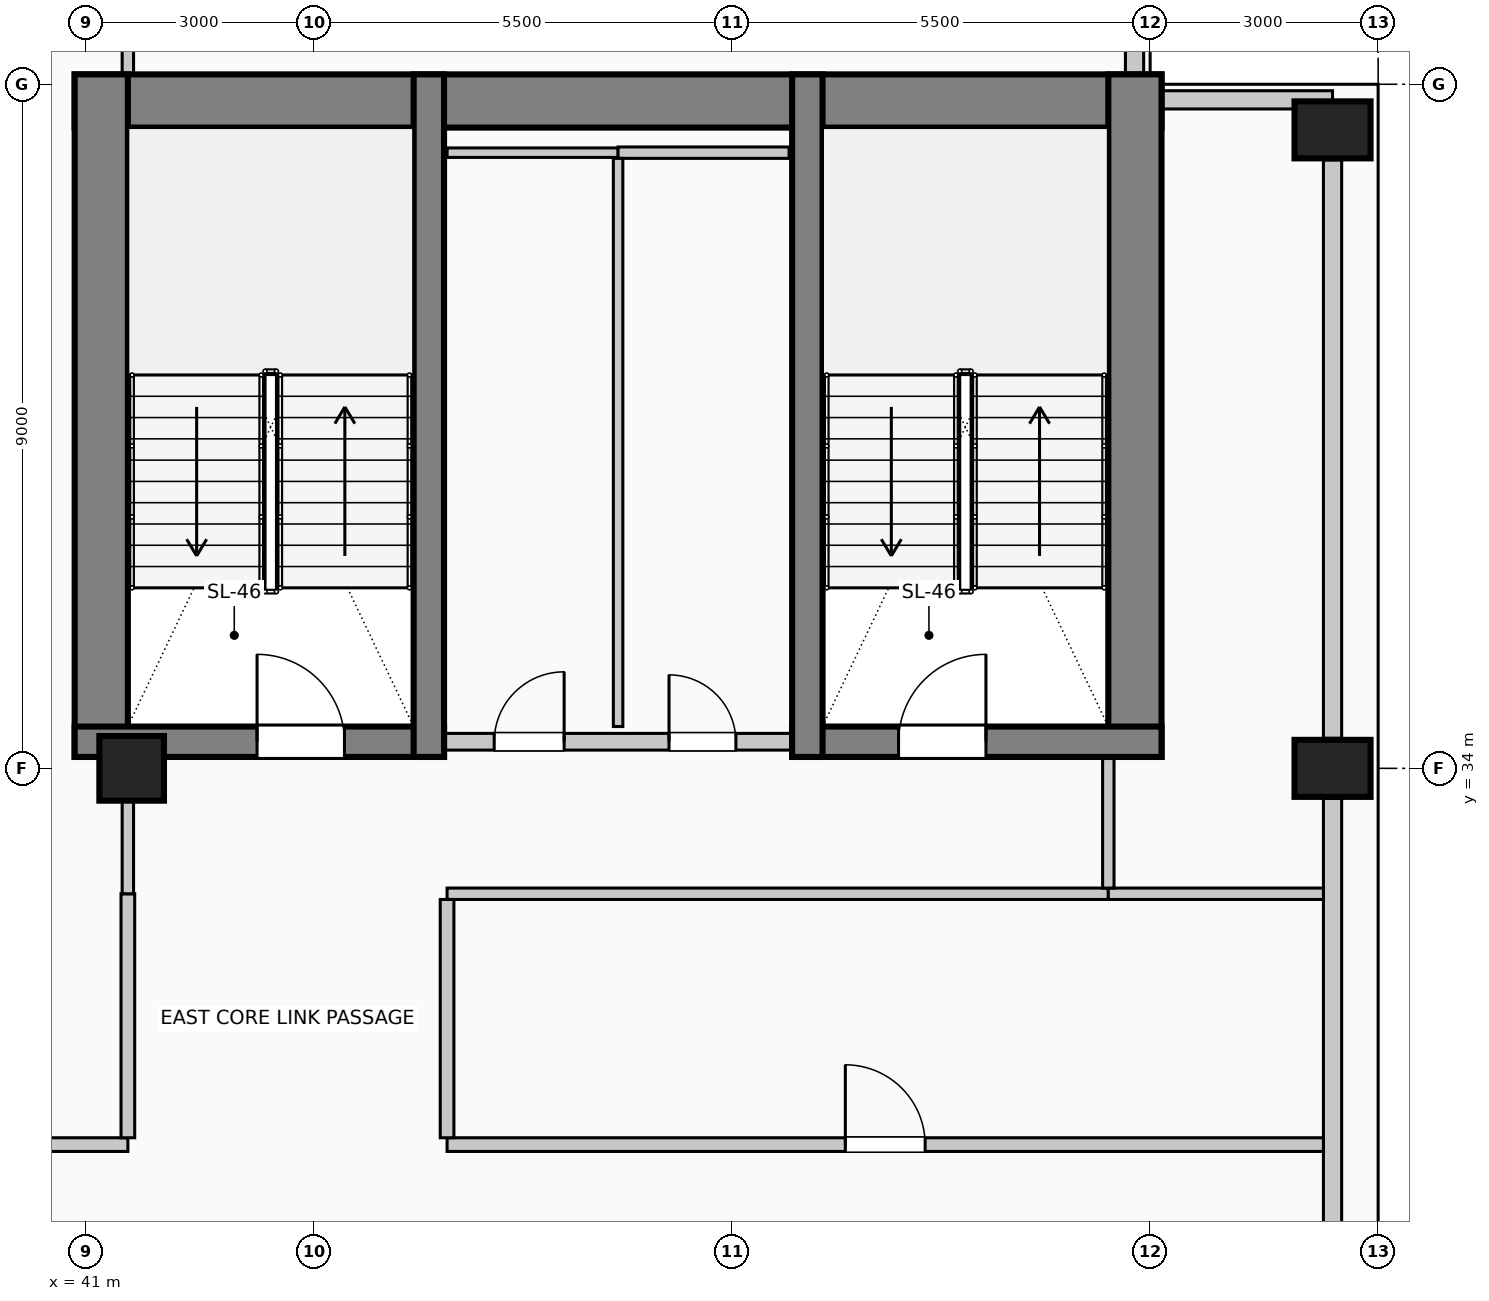
"""IFC4 building model, lengths in metres.
Left out: names, types, materials, properties, quantities, classifications, styles, units other than length and angle.
Written with IfcOpenShell. Run it as: python <this file> out.ifc"""

import sys

from ifc_helpers import new_model, si_unit, direction, frame, frame_2d, origin, origin_2d, place, context, subcontext, project, spatial, rectangle, circle, extrude, element, fill, save


model = new_model("IFC4")
c1 = context("Model", 3, precision=1e-05, world=origin(), true_north=direction((0.0, 1.0)))
c2 = subcontext(c1, "Body", "Model", "MODEL_VIEW")
j1 = project(units=[si_unit("LENGTHUNIT", "METRE"), si_unit("PLANEANGLEUNIT", "RADIAN")], contexts=[c1])
p1 = place(None, origin())
s1 = spatial("IfcSite", under=j1, at=p1, CompositionType="ELEMENT")
p2 = place(p1, origin())
s2 = spatial("IfcBuilding", under=s1, at=p2, CompositionType="ELEMENT")
p3 = place(p2, frame((0.0, 0.0, 252.6)))
s3 = spatial("IfcBuildingStorey", under=s2, at=p3, CompositionType="ELEMENT", Elevation=252.6)
p4 = place(p3, frame((40.85, 42.78, 0.0), z_axis=(0.0, 0.0, 1.0), x_axis=(1.0, 0.0, 0.0)))
e1 = element("IfcWall", 1, at=p4, inside=s3, PredefinedType="SHEAR", context=c2, shape_type="SweptSolid", body=[
    extrude(rectangle(XDim=14.3, YDim=0.7, at=frame_2d((7.15, 0.0))), origin(), (0.0, 0.0, 1.0), 4.0),
])
for number, where, z_axis, x_axis in (
    (2, (41.2, 34.15, 0.0), (0.0, 0.0, 1.0), (0.0, 1.0, 0.0)),
    (3, (54.8, 34.15, 0.0), (0.0, 0.0, 1.0), (0.0, 1.0, 0.0)),
):
    element("IfcWall", number, at=place(p3, frame(where, z_axis=z_axis, x_axis=x_axis)), inside=s3, PredefinedType="SHEAR", context=c2, shape_type="SweptSolid", body=[
        extrude(rectangle(XDim=8.98, YDim=0.7, at=frame_2d((4.49, 0.0))), origin(), (0.0, 0.0, 1.0), 4.0),
    ])
p5 = place(p3, frame((40.85, 34.35, 0.0), z_axis=(0.0, 0.0, 1.0), x_axis=(1.0, 0.0, 0.0)))
e4 = element("IfcWall", 4, at=p5, inside=s3, PredefinedType="SHEAR", context=c2, shape_type="SweptSolid", body=[
    extrude(rectangle(XDim=4.86, YDim=0.4, at=frame_2d((2.43, 0.0))), origin(), (0.0, 0.0, 1.0), 4.0),
])
p6 = place(p5, frame((2.4, 0.0, 0.0)))
e5 = element("IfcOpeningElement", 5, at=p6, cuts=e4, PredefinedType="OPENING", context=c2, shape_type="SweptSolid", body=[
    extrude(rectangle(XDim=1.15, YDim=2.2, at=frame_2d((0.575, 1.1))), frame((0.0, 0.21, 0.0), z_axis=(0.0, -1.0, 0.0), x_axis=(1.0, 0.0, 0.0)), (0.0, 0.0, 1.0), 0.42),
])
p7 = place(p3, frame((45.51, 34.15, 0.0), z_axis=(0.0, 0.0, 1.0), x_axis=(0.0, 1.0, 0.0)))
e6 = element("IfcWall", 6, at=p7, inside=s3, PredefinedType="SHEAR", context=c2, shape_type="SweptSolid", body=[
    extrude(rectangle(XDim=8.98, YDim=0.4, at=frame_2d((4.49, 0.0))), origin(), (0.0, 0.0, 1.0), 4.0),
])
p8 = place(p3, frame((50.29, 34.35, 0.0), z_axis=(0.0, 0.0, 1.0), x_axis=(1.0, 0.0, 0.0)))
e7 = element("IfcWall", 7, at=p8, inside=s3, PredefinedType="SHEAR", context=c2, shape_type="SweptSolid", body=[
    extrude(rectangle(XDim=4.86, YDim=0.4, at=frame_2d((2.43, 0.0))), origin(), (0.0, 0.0, 1.0), 4.0),
])
p9 = place(p8, frame((1.4, 0.0, 0.0)))
e8 = element("IfcOpeningElement", 8, at=p9, cuts=e7, PredefinedType="OPENING", context=c2, shape_type="SweptSolid", body=[
    extrude(rectangle(XDim=1.15, YDim=2.2, at=frame_2d((0.575, 1.1))), frame((0.0, 0.21, 0.0), z_axis=(0.0, -1.0, 0.0), x_axis=(1.0, 0.0, 0.0)), (0.0, 0.0, 1.0), 0.42),
])
p10 = place(p3, frame((50.49, 34.15, 0.0), z_axis=(0.0, 0.0, 1.0), x_axis=(0.0, 1.0, 0.0)))
e9 = element("IfcWall", 9, at=p10, inside=s3, PredefinedType="SHEAR", context=c2, shape_type="SweptSolid", body=[
    extrude(rectangle(XDim=8.98, YDim=0.4, at=frame_2d((4.49, 0.0))), origin(), (0.0, 0.0, 1.0), 4.0),
])
for number, where, z_axis, x_axis in (
    (10, (57.4, 34.0, 0.0), (0.0, 0.0, 1.0), (0.0, 1.0, 0.0)),
    (11, (57.4, 42.4, 0.0), (0.0, 0.0, 1.0), (0.0, 1.0, 0.0)),
):
    element("IfcColumn", number, at=place(p3, frame(where, z_axis=z_axis, x_axis=x_axis)), inside=s3, PredefinedType="COLUMN", context=c2, shape_type="SweptSolid", body=[
        extrude(rectangle(XDim=0.75, YDim=1.0, at=origin_2d()), origin(), (0.0, 0.0, 1.0), 4.0),
    ])
p11 = place(p3, frame((41.6, 34.0, 0.0), z_axis=(0.0, 0.0, 1.0), x_axis=(1.0, 0.0, 0.0)))
e12 = element("IfcColumn", 12, at=p11, inside=s3, PredefinedType="COLUMN", context=c2, shape_type="SweptSolid", body=[
    extrude(circle(Radius=0.425, at=origin_2d()), origin(), (0.0, 0.0, 1.0), 4.0),
])
p12 = place(p3, frame((57.4, 33.605, 0.0), z_axis=(0.0, 0.0, 1.0), x_axis=(0.0, -1.0, 0.0)))
e13 = element("IfcWall", 13, at=p12, inside=s3, PredefinedType="SOLIDWALL", context=c2, shape_type="SweptSolid", body=[
    extrude(rectangle(XDim=7.21, YDim=0.24, at=frame_2d((3.605, 0.0))), origin(), (0.0, 0.0, 1.0), 3.0),
])
p13 = place(p3, frame((57.4, 42.005, 0.0), z_axis=(0.0, 0.0, 1.0), x_axis=(0.0, -1.0, 0.0)))
e14 = element("IfcWall", 14, at=p13, inside=s3, PredefinedType="SOLIDWALL", context=c2, shape_type="SweptSolid", body=[
    extrude(rectangle(XDim=7.61, YDim=0.24, at=frame_2d((3.805, 0.0))), origin(), (0.0, 0.0, 1.0), 3.0),
])
p14 = place(p3, frame((54.795, 45.4, 0.0), z_axis=(0.0, 0.0, 1.0), x_axis=(0.0, -1.0, 0.0)))
e15 = element("IfcWall", 15, at=p14, inside=s3, PredefinedType="SOLIDWALL", context=c2, shape_type="SweptSolid", body=[
    extrude(rectangle(XDim=2.265, YDim=0.24, at=frame_2d((1.132, 0.0))), origin(), (0.0, 0.0, 1.0), 3.75),
])
p15 = place(p3, frame((55.155, 42.795, 0.0), z_axis=(0.0, 0.0, 1.0), x_axis=(1.0, 0.0, 0.0)))
e16 = element("IfcWall", 16, at=p15, inside=s3, PredefinedType="SOLIDWALL", context=c2, shape_type="SweptSolid", body=[
    extrude(rectangle(XDim=2.245, YDim=0.24, at=frame_2d((1.123, 0.0))), origin(), (0.0, 0.0, 1.0), 3.75),
])
p16 = place(p3, frame((45.72, 34.35, 0.0), z_axis=(0.0, 0.0, 1.0), x_axis=(1.0, 0.0, 0.0)))
e17 = element("IfcWall", 17, at=p16, inside=s3, PredefinedType="PARTITIONING", context=c2, shape_type="SweptSolid", body=[
    extrude(rectangle(XDim=4.56, YDim=0.22, at=frame_2d((2.28, 0.0))), origin(), (0.0, 0.0, 1.0), 3.75),
])
p17 = place(p16, frame((0.65, 0.0, 0.0)))
e18 = element("IfcOpeningElement", 18, at=p17, cuts=e17, PredefinedType="OPENING", context=c2, shape_type="SweptSolid", body=[
    extrude(rectangle(XDim=0.92, YDim=2.1, at=frame_2d((0.46, 1.05))), frame((0.0, 0.12, 0.0), z_axis=(0.0, -1.0, 0.0), x_axis=(1.0, 0.0, 0.0)), (0.0, 0.0, 1.0), 0.24),
])
p18 = place(p16, frame((2.95, 0.0, 0.0)))
e19 = element("IfcOpeningElement", 19, at=p18, cuts=e17, PredefinedType="OPENING", context=c2, shape_type="SweptSolid", body=[
    extrude(rectangle(XDim=0.88, YDim=2.1, at=frame_2d((0.44, 1.05))), frame((0.0, 0.12, 0.0), z_axis=(0.0, -1.0, 0.0), x_axis=(1.0, 0.0, 0.0)), (0.0, 0.0, 1.0), 0.24),
])
p19 = place(p3, frame((30.43, 29.05, 0.0), z_axis=(0.0, 0.0, 1.0), x_axis=(1.0, 0.0, 0.0)))
e20 = element("IfcWall", 20, at=p19, inside=s3, PredefinedType="PARTITIONING", context=c2, shape_type="SweptSolid", body=[
    extrude(rectangle(XDim=11.12, YDim=0.18, at=frame_2d((5.56, 0.0))), origin(), (0.0, 0.0, 1.0), 3.75),
])
p20 = place(p19, frame((5.085, 0.0, 0.0)))
e21 = element("IfcOpeningElement", 21, at=p20, cuts=e20, PredefinedType="OPENING", context=c2, shape_type="SweptSolid", body=[
    extrude(rectangle(XDim=0.95, YDim=2.15, at=frame_2d((0.475, 1.075))), frame((0.0, 0.1, 0.0), z_axis=(0.0, -1.0, 0.0), x_axis=(1.0, 0.0, 0.0)), (0.0, 0.0, 1.0), 0.2),
])
p21 = place(p3, frame((45.75, 29.05, 0.0), z_axis=(0.0, 0.0, 1.0), x_axis=(1.0, 0.0, 0.0)))
e22 = element("IfcWall", 22, at=p21, inside=s3, PredefinedType="PARTITIONING", context=c2, shape_type="SweptSolid", body=[
    extrude(rectangle(XDim=11.53, YDim=0.18, at=frame_2d((5.765, 0.0))), origin(), (0.0, 0.0, 1.0), 3.75),
])
p22 = place(p21, frame((5.24, 0.0, 0.0)))
e23 = element("IfcOpeningElement", 23, at=p22, cuts=e22, PredefinedType="OPENING", context=c2, shape_type="SweptSolid", body=[
    extrude(rectangle(XDim=1.05, YDim=2.15, at=frame_2d((0.525, 1.075))), frame((0.0, 0.1, 0.0), z_axis=(0.0, -1.0, 0.0), x_axis=(1.0, 0.0, 0.0)), (0.0, 0.0, 1.0), 0.2),
])
p23 = place(p3, frame((45.75, 32.35, 0.0), z_axis=(0.0, 0.0, 1.0), x_axis=(1.0, 0.0, 0.0)))
e24 = element("IfcWall", 24, at=p23, inside=s3, PredefinedType="PARTITIONING", context=c2, shape_type="SweptSolid", body=[
    extrude(rectangle(XDim=8.7, YDim=0.15, at=frame_2d((4.35, 0.0))), origin(), (0.0, 0.0, 1.0), 3.75),
])
p24 = place(p3, frame((54.45, 32.35, 0.0), z_axis=(0.0, 0.0, 1.0), x_axis=(1.0, 0.0, 0.0)))
e25 = element("IfcWall", 25, at=p24, inside=s3, PredefinedType="PARTITIONING", context=c2, shape_type="SweptSolid", body=[
    extrude(rectangle(XDim=2.83, YDim=0.15, at=frame_2d((1.415, 0.0))), origin(), (0.0, 0.0, 1.0), 3.75),
])
p25 = place(p3, frame((45.75, 42.1, 0.0), z_axis=(0.0, 0.0, 1.0), x_axis=(1.0, 0.0, 0.0)))
e26 = element("IfcWall", 26, at=p25, inside=s3, PredefinedType="PARTITIONING", context=c2, shape_type="SweptSolid", body=[
    extrude(rectangle(XDim=2.25, YDim=0.125, at=frame_2d((1.125, 0.0))), origin(), (0.0, 0.0, 1.0), 3.75),
])
p26 = place(p3, frame((48.0, 42.1, 0.0), z_axis=(0.0, 0.0, 1.0), x_axis=(1.0, 0.0, 0.0)))
e27 = element("IfcWall", 27, at=p26, inside=s3, PredefinedType="PARTITIONING", context=c2, shape_type="SweptSolid", body=[
    extrude(rectangle(XDim=2.25, YDim=0.15, at=frame_2d((1.125, 0.0))), origin(), (0.0, 0.0, 1.0), 3.75),
])
p27 = place(p3, frame((41.55, 29.14, 0.0), z_axis=(0.0, 0.0, 1.0), x_axis=(0.0, 1.0, 0.0)))
e28 = element("IfcWall", 28, at=p27, inside=s3, PredefinedType="PARTITIONING", context=c2, shape_type="SweptSolid", body=[
    extrude(rectangle(XDim=3.21, YDim=0.18, at=frame_2d((1.605, 0.0))), origin(), (0.0, 0.0, 1.0), 3.195),
])
p28 = place(p3, frame((41.55, 32.35, 0.0), z_axis=(0.0, 0.0, 1.0), x_axis=(0.0, 1.0, 0.0)))
e29 = element("IfcWall", 29, at=p28, inside=s3, PredefinedType="PARTITIONING", context=c2, shape_type="SweptSolid", body=[
    extrude(rectangle(XDim=1.225, YDim=0.15, at=frame_2d((0.612, 0.0))), origin(), (0.0, 0.0, 1.0), 3.195),
])
p29 = place(p3, frame((41.55, 43.13, 0.0), z_axis=(0.0, 0.0, 1.0), x_axis=(0.0, 1.0, 0.0)))
e30 = element("IfcWall", 30, at=p29, inside=s3, PredefinedType="PARTITIONING", context=c2, shape_type="SweptSolid", body=[
    extrude(rectangle(XDim=1.62, YDim=0.15, at=frame_2d((0.81, 0.0))), origin(), (0.0, 0.0, 1.0), 3.75),
])
p30 = place(p3, frame((45.75, 29.14, 0.0), z_axis=(0.0, 0.0, 1.0), x_axis=(0.0, 1.0, 0.0)))
e31 = element("IfcWall", 31, at=p30, inside=s3, PredefinedType="PARTITIONING", context=c2, shape_type="SweptSolid", body=[
    extrude(rectangle(XDim=3.135, YDim=0.18, at=frame_2d((1.567, 0.0))), origin(), (0.0, 0.0, 1.0), 3.75),
])
p31 = place(p3, frame((48.0, 34.55, 0.0), z_axis=(0.0, 0.0, 1.0), x_axis=(0.0, 1.0, 0.0)))
e32 = element("IfcWall", 32, at=p31, inside=s3, PredefinedType="PARTITIONING", context=c2, shape_type="SweptSolid", body=[
    extrude(rectangle(XDim=7.475, YDim=0.125, at=frame_2d((3.737, 0.0))), origin(), (0.0, 0.0, 1.0), 3.75),
])
p32 = place(p3, frame((54.45, 32.425, 0.0), z_axis=(0.0, 0.0, 1.0), x_axis=(0.0, 1.0, 0.0)))
e33 = element("IfcWall", 33, at=p32, inside=s3, PredefinedType="PARTITIONING", context=c2, shape_type="SweptSolid", body=[
    extrude(rectangle(XDim=1.725, YDim=0.15, at=frame_2d((0.862, 0.0))), origin(), (0.0, 0.0, 1.0), 3.75),
])
p33 = place(p6, origin())
e34 = element("IfcDoor", 34, at=p33, inside=s3, OperationType="SINGLE_SWING_LEFT", PredefinedType="DOOR", context=c2, shape_type="SweptSolid", body=[
    extrude(rectangle(XDim=1.15, YDim=2.2, at=frame_2d((0.575, 1.1))), frame((0.0, 0.025, 0.0), z_axis=(0.0, -1.0, 0.0), x_axis=(1.0, 0.0, 0.0)), (0.0, 0.0, 1.0), 0.05),
])
fill(e5, e34)
p34 = place(p17, origin())
e35 = element("IfcDoor", 35, at=p34, inside=s3, OperationType="SINGLE_SWING_RIGHT", PredefinedType="DOOR", context=c2, shape_type="SweptSolid", body=[
    extrude(rectangle(XDim=0.92, YDim=2.1, at=frame_2d((0.46, 1.05))), frame((0.0, 0.025, 0.0), z_axis=(0.0, -1.0, 0.0), x_axis=(1.0, 0.0, 0.0)), (0.0, 0.0, 1.0), 0.05),
])
fill(e18, e35)
p35 = place(p18, origin())
e36 = element("IfcDoor", 36, at=p35, inside=s3, OperationType="SINGLE_SWING_LEFT", PredefinedType="DOOR", context=c2, shape_type="SweptSolid", body=[
    extrude(rectangle(XDim=0.88, YDim=2.1, at=frame_2d((0.44, 1.05))), frame((0.0, 0.025, 0.0), z_axis=(0.0, -1.0, 0.0), x_axis=(1.0, 0.0, 0.0)), (0.0, 0.0, 1.0), 0.05),
])
fill(e19, e36)
p36 = place(p9, origin())
e37 = element("IfcDoor", 37, at=p36, inside=s3, OperationType="SINGLE_SWING_RIGHT", PredefinedType="DOOR", context=c2, shape_type="SweptSolid", body=[
    extrude(rectangle(XDim=1.15, YDim=2.2, at=frame_2d((0.575, 1.1))), frame((0.0, 0.025, 0.0), z_axis=(0.0, -1.0, 0.0), x_axis=(1.0, 0.0, 0.0)), (0.0, 0.0, 1.0), 0.05),
])
fill(e8, e37)
p37 = place(p22, origin())
e38 = element("IfcDoor", 38, at=p37, inside=s3, OperationType="SINGLE_SWING_LEFT", PredefinedType="DOOR", context=c2, shape_type="SweptSolid", body=[
    extrude(rectangle(XDim=1.05, YDim=2.15, at=frame_2d((0.525, 1.075))), frame((0.0, 0.025, 0.0), z_axis=(0.0, -1.0, 0.0), x_axis=(1.0, 0.0, 0.0)), (0.0, 0.0, 1.0), 0.05),
])
fill(e23, e38)
save(model, sys.argv[1])
